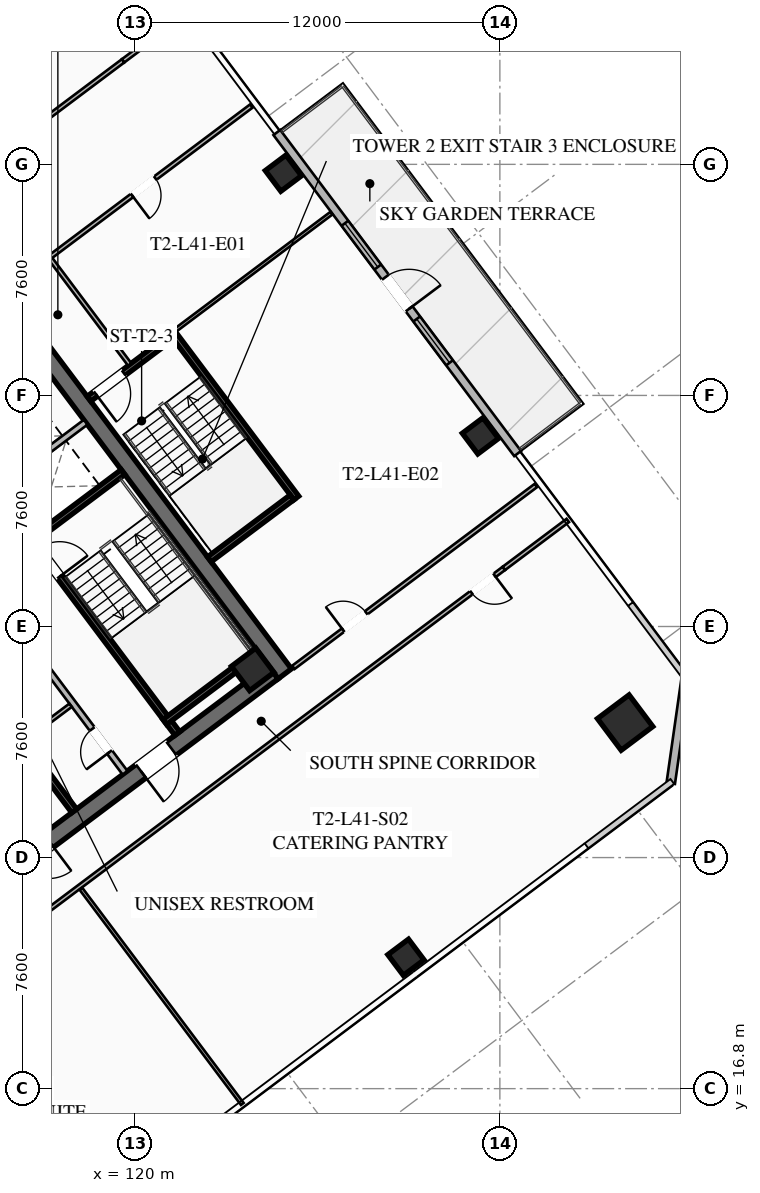
"""IFC4 building model, lengths in metres.
Left out: names, types, materials, properties, quantities, classifications, styles, units other than length and angle.
Written with IfcOpenShell. Run it as: python <this file> out.ifc"""

import sys

from ifc_helpers import new_model, si_unit, direction, frame, frame_2d, origin, origin_2d, place, context, subcontext, project, spatial, rectangle, hollow_rectangle, extrude, element, fill, save


model = new_model("IFC4")
c1 = context("Model", 3, precision=1e-05, world=origin(), true_north=direction((0.0, 1.0)))
c2 = subcontext(c1, "Body", "Model", "MODEL_VIEW")
j1 = project(units=[si_unit("LENGTHUNIT", "METRE"), si_unit("PLANEANGLEUNIT", "RADIAN")], contexts=[c1])
p1 = place(None, origin())
s1 = spatial("IfcSite", under=j1, at=p1, CompositionType="ELEMENT")
p2 = place(p1, origin())
s2 = spatial("IfcBuilding", under=s1, at=p2, CompositionType="ELEMENT")
p3 = place(p2, frame((0.0, 0.0, 153.45)))
s3 = spatial("IfcBuildingStorey", under=s2, at=p3, CompositionType="ELEMENT", Elevation=153.45)
p4 = place(p3, frame((115.564, 42.923, 0.0), z_axis=(0.0, 0.0, 1.0), x_axis=(0.600005007985, -0.799996243986, 0.0)))
e1 = element("IfcWall", 1, at=p4, inside=s3, PredefinedType="SHEAR", context=c2, shape_type="SweptSolid", body=[
    extrude(rectangle(XDim=15.6, YDim=0.55, at=frame_2d((7.8, 0.0))), origin(), (0.0, 0.0, 1.0), 3.55),
])
p5 = place(p3, frame((124.539, 30.498, 0.0), z_axis=(0.0, 0.0, 1.0), x_axis=(-0.799998054672, -0.600002593761, 0.0)))
e2 = element("IfcWall", 2, at=p5, inside=s3, PredefinedType="SHEAR", context=c2, shape_type="SweptSolid", body=[
    extrude(rectangle(XDim=15.06, YDim=0.55, at=frame_2d((7.53, 0.0))), origin(), (0.0, 0.0, 1.0), 3.55),
])
p6 = place(p5, frame((9.23, 0.0, 0.0)))
e3 = element("IfcOpeningElement", 3, at=p6, cuts=e2, PredefinedType="OPENING", context=c2, shape_type="SweptSolid", body=[
    extrude(rectangle(XDim=1.25, YDim=2.25, at=frame_2d((0.625, 1.125))), frame((0.0, 0.285, 0.0), z_axis=(0.0, -1.0, 0.0), x_axis=(1.0, 0.0, 0.0)), (0.0, 0.0, 1.0), 0.57),
])
p7 = place(p5, frame((4.18, 0.0, 0.0)))
e4 = element("IfcOpeningElement", 4, at=p7, cuts=e2, PredefinedType="OPENING", context=c2, shape_type="SweptSolid", body=[
    extrude(rectangle(XDim=1.25, YDim=2.25, at=frame_2d((0.625, 1.125))), frame((0.0, 0.285, 0.0), z_axis=(0.0, -1.0, 0.0), x_axis=(1.0, 0.0, 0.0)), (0.0, 0.0, 1.0), 0.57),
])
p8 = place(p3, frame((123.87, 30.59, 0.0), z_axis=(0.0, 0.0, 1.0), x_axis=(0.799999996291, 0.600000004945, 0.0)))
e5 = element("IfcColumn", 5, at=p8, inside=s3, PredefinedType="COLUMN", context=c2, shape_type="SweptSolid", body=[
    extrude(hollow_rectangle(XDim=1.0, YDim=1.0, WallThickness=0.04, at=origin_2d()), origin(), (0.0, 0.0, 1.0), 3.37),
])
p9 = place(p3, frame((136.12, 28.84, 0.0), z_axis=(0.0, 0.0, 1.0), x_axis=(0.799999996291, 0.600000004945, 0.0)))
e6 = element("IfcColumn", 6, at=p9, inside=s3, PredefinedType="COLUMN", context=c2, shape_type="SweptSolid", body=[
    extrude(hollow_rectangle(XDim=1.3, YDim=1.3, WallThickness=0.05, at=origin_2d()), origin(), (0.0, 0.0, 1.0), 3.37),
])
for number, where, z_axis, x_axis in (
    (7, (128.91, 21.12, 0.0), (0.0, 0.0, 1.0), (0.8, 0.6, 0.0)),
    (8, (131.36, 38.27, 0.0), (0.0, 0.0, 1.0), (0.8, 0.6, 0.0)),
    (9, (124.88, 46.91, 0.0), (0.0, 0.0, 1.0), (0.8, 0.6, 0.0)),
):
    element("IfcColumn", number, at=place(p3, frame(where, z_axis=z_axis, x_axis=x_axis)), inside=s3, PredefinedType="COLUMN", context=c2, shape_type="SweptSolid", body=[
        extrude(hollow_rectangle(XDim=0.85, YDim=0.85, WallThickness=0.035, at=origin_2d()), origin(), (0.0, 0.0, 1.0), 3.37),
    ])
p10 = place(p3, frame((124.664, 48.248, 0.0), z_axis=(0.0, 0.0, 1.0), x_axis=(0.599994081423, -0.800004438899, 0.0)))
e10 = element("IfcWall", 10, at=p10, inside=s3, PredefinedType="SOLIDWALL", context=c2, shape_type="SweptSolid", body=[
    extrude(rectangle(XDim=13.2, YDim=0.28, at=frame_2d((6.6, 0.0))), origin(), (0.0, 0.0, 1.0), 3.37),
])
p11 = place(p10, frame((5.95, 0.0, 0.0)))
e11 = element("IfcOpeningElement", 11, at=p11, cuts=e10, PredefinedType="OPENING", context=c2, shape_type="SweptSolid", body=[
    extrude(rectangle(XDim=1.3, YDim=2.15, at=frame_2d((0.65, 1.075))), frame((0.0, 0.15, 0.0), z_axis=(0.0, -1.0, 0.0), x_axis=(1.0, 0.0, 0.0)), (0.0, 0.0, 1.0), 0.3),
])
p12 = place(p10, frame((3.732, 0.0, 0.85)))
e12 = element("IfcOpeningElement", 12, at=p12, cuts=e10, PredefinedType="OPENING", context=c2, shape_type="SweptSolid", body=[
    extrude(rectangle(XDim=1.8, YDim=1.92, at=frame_2d((0.9, 0.96))), frame((0.0, 0.15, 0.0), z_axis=(0.0, -1.0, 0.0), x_axis=(1.0, 0.0, 0.0)), (0.0, 0.0, 1.0), 0.3),
])
p13 = place(p10, frame((7.668, 0.0, 0.85)))
e13 = element("IfcOpeningElement", 13, at=p13, cuts=e10, PredefinedType="OPENING", context=c2, shape_type="SweptSolid", body=[
    extrude(rectangle(XDim=1.8, YDim=1.92, at=frame_2d((0.9, 0.96))), frame((0.0, 0.15, 0.0), z_axis=(0.0, -1.0, 0.0), x_axis=(1.0, 0.0, 0.0)), (0.0, 0.0, 1.0), 0.3),
])
p14 = place(p3, frame((138.12, 30.34, 0.0), z_axis=(0.0, 0.0, 1.0), x_axis=(-0.141421356237, -0.989949493661, 0.0)))
e14 = element("IfcWall", 14, at=p14, inside=s3, PredefinedType="SOLIDWALL", context=c2, shape_type="SweptSolid", body=[
    extrude(rectangle(XDim=3.536, YDim=0.28, at=frame_2d((1.768, 0.0))), origin(), (0.0, 0.0, 1.0), 3.37),
])
p15 = place(p3, frame((116.56, 34.92, 0.0), z_axis=(0.0, 0.0, 1.0), x_axis=(0.59999029481, -0.8000072788, 0.0)))
e15 = element("IfcWall", 15, at=p15, inside=s3, PredefinedType="SHEAR", context=c2, shape_type="SweptSolid", body=[
    extrude(rectangle(XDim=8.05, YDim=0.2, at=frame_2d((4.025, 0.0))), origin(), (0.0, 0.0, 1.0), 3.37),
])
p16 = place(p15, frame((0.45, 0.0, 0.0)))
e16 = element("IfcOpeningElement", 16, at=p16, cuts=e15, PredefinedType="OPENING", context=c2, shape_type="SweptSolid", body=[
    extrude(rectangle(XDim=1.15, YDim=2.2, at=frame_2d((0.575, 1.1))), frame((0.0, 0.11, 0.0), z_axis=(0.0, -1.0, 0.0), x_axis=(1.0, 0.0, 0.0)), (0.0, 0.0, 1.0), 0.22),
])
for number, where, z_axis, x_axis in (
    (17, (116.54, 34.78, 0.0), (0.0, 0.0, 1.0), (0.8, 0.6, 0.0)),
    (18, (120.98, 28.86, 0.0), (0.0, 0.0, 1.0), (0.8, 0.6, 0.0)),
):
    element("IfcWall", number, at=place(p3, frame(where, z_axis=z_axis, x_axis=x_axis)), inside=s3, PredefinedType="SHEAR", context=c2, shape_type="SweptSolid", body=[
        extrude(rectangle(XDim=3.83, YDim=0.2, at=frame_2d((1.915, 0.0))), origin(), (0.0, 0.0, 1.0), 3.37),
    ])
p17 = place(p3, frame((117.998, 25.936, 0.0), z_axis=(0.0, 0.0, 1.0), x_axis=(-0.600002693989, 0.799997979501, 0.0)))
e19 = element("IfcWall", 19, at=p17, inside=s3, PredefinedType="SHEAR", context=c2, shape_type="SweptSolid", body=[
    extrude(rectangle(XDim=14.5, YDim=0.2, at=frame_2d((7.25, 0.0))), origin(), (0.0, 0.0, 1.0), 3.37),
])
p18 = place(p3, frame((115.59, 36.63, 0.0), z_axis=(0.0, 0.0, 1.0), x_axis=(0.799974743577, 0.600033673754, 0.0)))
e20 = element("IfcWall", 20, at=p18, inside=s3, PredefinedType="SOLIDWALL", context=c2, shape_type="SweptSolid", body=[
    extrude(rectangle(XDim=3.48, YDim=0.2, at=frame_2d((1.74, 0.0))), origin(), (0.0, 0.0, 1.0), 3.37),
])
p19 = place(p3, frame((119.67, 27.19, 0.0), z_axis=(0.0, 0.0, 1.0), x_axis=(-0.599988677396, 0.800008491828, 0.0)))
e21 = element("IfcWall", 21, at=p19, inside=s3, PredefinedType="SOLIDWALL", context=c2, shape_type="SweptSolid", body=[
    extrude(rectangle(XDim=6.9, YDim=0.2, at=frame_2d((3.45, 0.0))), origin(), (0.0, 0.0, 1.0), 2.513),
])
p20 = place(p19, frame((0.85, 0.0, 0.0)))
e22 = element("IfcOpeningElement", 22, at=p20, cuts=e21, PredefinedType="OPENING", context=c2, shape_type="SweptSolid", body=[
    extrude(rectangle(XDim=0.95, YDim=2.05, at=frame_2d((0.475, 1.025))), frame((0.0, 0.11, 0.0), z_axis=(0.0, -1.0, 0.0), x_axis=(1.0, 0.0, 0.0)), (0.0, 0.0, 1.0), 0.22),
])
p21 = place(p19, frame((4.8, 0.0, 0.0)))
e23 = element("IfcOpeningElement", 23, at=p21, cuts=e21, PredefinedType="OPENING", context=c2, shape_type="SweptSolid", body=[
    extrude(rectangle(XDim=1.05, YDim=2.2, at=frame_2d((0.525, 1.1))), frame((0.0, 0.11, 0.0), z_axis=(0.0, -1.0, 0.0), x_axis=(1.0, 0.0, 0.0)), (0.0, 0.0, 1.0), 0.22),
])
p22 = place(p3, frame((116.376, 28.282, 0.0), z_axis=(0.0, 0.0, 1.0), x_axis=(0.8, 0.6, 0.0)))
e24 = element("IfcWall", 24, at=p22, inside=s3, PredefinedType="PARTITIONING", context=c2, shape_type="SweptSolid", body=[
    extrude(rectangle(XDim=1.88, YDim=0.135, at=frame_2d((0.94, 0.0))), origin(), (0.0, 0.0, 1.0), 2.513),
])
p23 = place(p3, frame((125.304, 36.228, 0.0), z_axis=(0.0, 0.0, 1.0), x_axis=(-0.59998851072, 0.800008616831, 0.0)))
e25 = element("IfcWall", 25, at=p23, inside=s3, PredefinedType="SHEAR", context=c2, shape_type="SweptSolid", body=[
    extrude(rectangle(XDim=6.8, YDim=0.2, at=frame_2d((3.4, 0.0))), origin(), (0.0, 0.0, 1.0), 3.37),
])
p24 = place(p3, frame((121.204, 41.528, 0.0), z_axis=(0.0, 0.0, 1.0), x_axis=(-0.800017232136, -0.599977023131, 0.0)))
e26 = element("IfcWall", 26, at=p24, inside=s3, PredefinedType="SHEAR", context=c2, shape_type="SweptSolid", body=[
    extrude(rectangle(XDim=3.4, YDim=0.2, at=frame_2d((1.7, 0.0))), origin(), (0.0, 0.0, 1.0), 3.37),
])
p25 = place(p24, frame((1.975, 0.0, 0.0)))
e27 = element("IfcOpeningElement", 27, at=p25, cuts=e26, PredefinedType="OPENING", context=c2, shape_type="SweptSolid", body=[
    extrude(rectangle(XDim=1.15, YDim=2.2, at=frame_2d((0.575, 1.1))), frame((0.0, 0.11, 0.0), z_axis=(0.0, -1.0, 0.0), x_axis=(1.0, 0.0, 0.0)), (0.0, 0.0, 1.0), 0.22),
])
p26 = place(p3, frame((122.444, 34.208, 0.0), z_axis=(0.0, 0.0, 1.0), x_axis=(0.79999138319, 0.600011488909, 0.0)))
e28 = element("IfcWall", 28, at=p26, inside=s3, PredefinedType="SHEAR", context=c2, shape_type="SweptSolid", body=[
    extrude(rectangle(XDim=3.4, YDim=0.2, at=frame_2d((1.7, 0.0))), origin(), (0.0, 0.0, 1.0), 3.37),
])
p27 = place(p3, frame((119.824, 40.618, 0.0), z_axis=(0.0, 0.0, 1.0), x_axis=(-0.599982243973, 0.800013316712, 0.0)))
e29 = element("IfcWall", 29, at=p27, inside=s3, PredefinedType="PARTITIONING", context=c2, shape_type="SweptSolid", body=[
    extrude(rectangle(XDim=4.4, YDim=0.135, at=frame_2d((2.2, 0.0))), origin(), (0.0, 0.0, 1.0), 2.513),
])
p28 = place(p3, frame((94.568, 31.826, 0.0), z_axis=(0.0, 0.0, 1.0), x_axis=(0.799997191971, 0.600003744021, 0.0)))
e30 = element("IfcWall", 30, at=p28, inside=s3, PredefinedType="PARTITIONING", context=c2, shape_type="SweptSolid", body=[
    extrude(rectangle(XDim=31.3, YDim=0.135, at=frame_2d((15.65, 0.0))), origin(), (0.0, 0.0, 1.0), 2.513),
])
p29 = place(p28, frame((0.3, 0.0, 0.0)))
e31 = element("IfcOpeningElement", 31, at=p29, cuts=e30, PredefinedType="OPENING", context=c2, shape_type="SweptSolid", body=[
    extrude(rectangle(XDim=0.95, YDim=2.05, at=frame_2d((0.475, 1.025))), frame((0.0, 0.077, 0.0), z_axis=(0.0, -1.0, 0.0), x_axis=(1.0, 0.0, 0.0)), (0.0, 0.0, 1.0), 0.155),
])
p30 = place(p3, frame((119.608, 50.606, 0.0), z_axis=(0.0, 0.0, 1.0), x_axis=(0.799977721118, 0.600029704027, 0.0)))
e32 = element("IfcWall", 32, at=p30, inside=s3, PredefinedType="PARTITIONING", context=c2, shape_type="SweptSolid", body=[
    extrude(rectangle(XDim=2.63, YDim=0.135, at=frame_2d((1.315, 0.0))), origin(), (0.0, 0.0, 1.0), 2.513),
])
p31 = place(p3, frame((132.13, 33.91, 0.0), z_axis=(0.0, 0.0, 1.0), x_axis=(-0.799997191971, -0.600003744021, 0.0)))
e33 = element("IfcWall", 33, at=p31, inside=s3, PredefinedType="PARTITIONING", context=c2, shape_type="SweptSolid", body=[
    extrude(rectangle(XDim=31.3, YDim=0.135, at=frame_2d((15.65, 0.0))), origin(), (0.0, 0.0, 1.0), 2.513),
])
p32 = place(p31, frame((29.97, 0.0, 0.0)))
e34 = element("IfcOpeningElement", 34, at=p32, cuts=e33, PredefinedType="OPENING", context=c2, shape_type="SweptSolid", body=[
    extrude(rectangle(XDim=0.95, YDim=2.05, at=frame_2d((0.475, 1.025))), frame((0.0, 0.077, 0.0), z_axis=(0.0, -1.0, 0.0), x_axis=(1.0, 0.0, 0.0)), (0.0, 0.0, 1.0), 0.155),
])
p33 = place(p31, frame((0.38, 0.0, 0.0)))
e35 = element("IfcOpeningElement", 35, at=p33, cuts=e33, PredefinedType="OPENING", context=c2, shape_type="SweptSolid", body=[
    extrude(rectangle(XDim=0.95, YDim=2.05, at=frame_2d((0.475, 1.025))), frame((0.0, 0.077, 0.0), z_axis=(0.0, -1.0, 0.0), x_axis=(1.0, 0.0, 0.0)), (0.0, 0.0, 1.0), 0.155),
])
p34 = place(p3, frame((132.13, 33.91, 0.0), z_axis=(0.0, 0.0, 1.0), x_axis=(0.799977721118, 0.600029704027, 0.0)))
e36 = element("IfcWall", 36, at=p34, inside=s3, PredefinedType="PARTITIONING", context=c2, shape_type="SweptSolid", body=[
    extrude(rectangle(XDim=2.63, YDim=0.135, at=frame_2d((1.315, 0.0))), origin(), (0.0, 0.0, 1.0), 2.513),
])
p35 = place(p3, frame((123.528, 16.296, 0.0), z_axis=(0.0, 0.0, 1.0), x_axis=(-0.6, 0.8, 0.0)))
e37 = element("IfcWall", 37, at=p35, inside=s3, PredefinedType="PARTITIONING", context=c2, shape_type="SweptSolid", body=[
    extrude(rectangle(XDim=8.85, YDim=0.11, at=frame_2d((4.425, 0.0))), origin(), (0.0, 0.0, 1.0), 2.513),
])
p36 = place(p3, frame((123.824, 49.118, 0.0), z_axis=(0.0, 0.0, 1.0), x_axis=(-0.799996470201, -0.60000470637, 0.0)))
e38 = element("IfcWall", 38, at=p36, inside=s3, PredefinedType="PARTITIONING", context=c2, shape_type="SweptSolid", body=[
    extrude(rectangle(XDim=8.3, YDim=0.135, at=frame_2d((4.15, 0.0))), origin(), (0.0, 0.0, 1.0), 2.513),
])
p37 = place(p36, frame((3.95, 0.0, 0.0)))
e39 = element("IfcOpeningElement", 39, at=p37, cuts=e38, PredefinedType="OPENING", context=c2, shape_type="SweptSolid", body=[
    extrude(rectangle(XDim=0.95, YDim=2.05, at=frame_2d((0.475, 1.025))), frame((0.0, 0.077, 0.0), z_axis=(0.0, -1.0, 0.0), x_axis=(1.0, 0.0, 0.0)), (0.0, 0.0, 1.0), 0.155),
])
p38 = place(p3, frame((125.208, 30.656, 0.0), z_axis=(0.0, 0.0, 1.0), x_axis=(0.800005876956, 0.599992163979, 0.0)))
e40 = element("IfcWall", 40, at=p38, inside=s3, PredefinedType="PARTITIONING", context=c2, shape_type="SweptSolid", body=[
    extrude(rectangle(XDim=9.97, YDim=0.135, at=frame_2d((4.985, 0.0))), origin(), (0.0, 0.0, 1.0), 2.513),
])
p39 = place(p38, frame((2.045, 0.0, 0.0)))
e41 = element("IfcOpeningElement", 41, at=p39, cuts=e40, PredefinedType="OPENING", context=c2, shape_type="SweptSolid", body=[
    extrude(rectangle(XDim=0.95, YDim=2.05, at=frame_2d((0.475, 1.025))), frame((0.0, 0.077, 0.0), z_axis=(0.0, -1.0, 0.0), x_axis=(1.0, 0.0, 0.0)), (0.0, 0.0, 1.0), 0.155),
])
p40 = place(p3, frame((126.464, 45.598, 0.0), z_axis=(0.0, 0.0, 1.0), x_axis=(-0.8000181681, -0.599975775102, 0.0)))
e42 = element("IfcWall", 42, at=p40, inside=s3, PredefinedType="PARTITIONING", context=c2, shape_type="SweptSolid", body=[
    extrude(rectangle(XDim=6.45, YDim=0.11, at=frame_2d((3.225, 0.0))), origin(), (0.0, 0.0, 1.0), 2.513),
])
p41 = place(p11, origin())
e43 = element("IfcDoor", 43, at=p41, inside=s3, OperationType="SINGLE_SWING_RIGHT", PredefinedType="DOOR", context=c2, shape_type="SweptSolid", body=[
    extrude(rectangle(XDim=1.3, YDim=2.15, at=frame_2d((0.65, 1.075))), frame((0.0, 0.025, 0.0), z_axis=(0.0, -1.0, 0.0), x_axis=(1.0, 0.0, 0.0)), (0.0, 0.0, 1.0), 0.05),
])
fill(e11, e43)
p42 = place(p12, origin())
e44 = element("IfcWindow", 44, at=p42, inside=s3, PartitioningType="SINGLE_PANEL", PredefinedType="WINDOW", context=c2, shape_type="SweptSolid", body=[
    extrude(rectangle(XDim=1.8, YDim=1.92, at=frame_2d((0.9, 0.96))), frame((0.0, 0.03, 0.0), z_axis=(0.0, -1.0, 0.0), x_axis=(1.0, 0.0, 0.0)), (0.0, 0.0, 1.0), 0.06),
])
fill(e12, e44)
p43 = place(p13, origin())
e45 = element("IfcWindow", 45, at=p43, inside=s3, PartitioningType="SINGLE_PANEL", PredefinedType="WINDOW", context=c2, shape_type="SweptSolid", body=[
    extrude(rectangle(XDim=1.8, YDim=1.92, at=frame_2d((0.9, 0.96))), frame((0.0, 0.03, 0.0), z_axis=(0.0, -1.0, 0.0), x_axis=(1.0, 0.0, 0.0)), (0.0, 0.0, 1.0), 0.06),
])
fill(e13, e45)
p44 = place(p7, origin())
e46 = element("IfcDoor", 46, at=p44, inside=s3, OperationType="SINGLE_SWING_RIGHT", PredefinedType="DOOR", context=c2, shape_type="SweptSolid", body=[
    extrude(rectangle(XDim=1.25, YDim=2.25, at=frame_2d((0.625, 1.125))), frame((0.0, 0.025, 0.0), z_axis=(0.0, -1.0, 0.0), x_axis=(1.0, 0.0, 0.0)), (0.0, 0.0, 1.0), 0.05),
])
fill(e4, e46)
p45 = place(p16, origin())
e47 = element("IfcDoor", 47, at=p45, inside=s3, OperationType="SINGLE_SWING_RIGHT", PredefinedType="DOOR", context=c2, shape_type="SweptSolid", body=[
    extrude(rectangle(XDim=1.15, YDim=2.2, at=frame_2d((0.575, 1.1))), frame((0.0, 0.025, 0.0), z_axis=(0.0, -1.0, 0.0), x_axis=(1.0, 0.0, 0.0)), (0.0, 0.0, 1.0), 0.05),
])
fill(e16, e47)
p46 = place(p20, origin())
e48 = element("IfcDoor", 48, at=p46, inside=s3, OperationType="SINGLE_SWING_LEFT", PredefinedType="DOOR", context=c2, shape_type="SweptSolid", body=[
    extrude(rectangle(XDim=0.95, YDim=2.05, at=frame_2d((0.475, 1.025))), frame((0.0, 0.025, 0.0), z_axis=(0.0, -1.0, 0.0), x_axis=(1.0, 0.0, 0.0)), (0.0, 0.0, 1.0), 0.05),
])
fill(e22, e48)
p47 = place(p25, origin())
e49 = element("IfcDoor", 49, at=p47, inside=s3, OperationType="SINGLE_SWING_RIGHT", PredefinedType="DOOR", context=c2, shape_type="SweptSolid", body=[
    extrude(rectangle(XDim=1.15, YDim=2.2, at=frame_2d((0.575, 1.1))), frame((0.0, 0.025, 0.0), z_axis=(0.0, -1.0, 0.0), x_axis=(1.0, 0.0, 0.0)), (0.0, 0.0, 1.0), 0.05),
])
fill(e27, e49)
p48 = place(p33, origin())
e50 = element("IfcDoor", 50, at=p48, inside=s3, OperationType="SINGLE_SWING_LEFT", PredefinedType="DOOR", context=c2, shape_type="SweptSolid", body=[
    extrude(rectangle(XDim=0.95, YDim=2.05, at=frame_2d((0.475, 1.025))), frame((0.0, 0.025, 0.0), z_axis=(0.0, -1.0, 0.0), x_axis=(1.0, 0.0, 0.0)), (0.0, 0.0, 1.0), 0.05),
])
fill(e35, e50)
p49 = place(p37, origin())
e51 = element("IfcDoor", 51, at=p49, inside=s3, OperationType="SINGLE_SWING_RIGHT", PredefinedType="DOOR", context=c2, shape_type="SweptSolid", body=[
    extrude(rectangle(XDim=0.95, YDim=2.05, at=frame_2d((0.475, 1.025))), frame((0.0, 0.025, 0.0), z_axis=(0.0, -1.0, 0.0), x_axis=(1.0, 0.0, 0.0)), (0.0, 0.0, 1.0), 0.05),
])
fill(e39, e51)
p50 = place(p39, origin())
e52 = element("IfcDoor", 52, at=p50, inside=s3, OperationType="SINGLE_SWING_LEFT", PredefinedType="DOOR", context=c2, shape_type="SweptSolid", body=[
    extrude(rectangle(XDim=0.95, YDim=2.05, at=frame_2d((0.475, 1.025))), frame((0.0, 0.025, 0.0), z_axis=(0.0, -1.0, 0.0), x_axis=(1.0, 0.0, 0.0)), (0.0, 0.0, 1.0), 0.05),
])
fill(e41, e52)
save(model, sys.argv[1])
